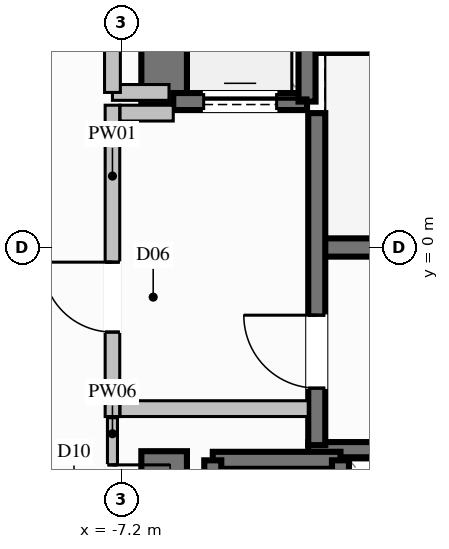
"""IFC4 building model, lengths in metres.
Left out: names, types, materials, properties, quantities, classifications, styles, units other than length and angle.
Written with IfcOpenShell. Run it as: python <this file> out.ifc"""

import sys

from ifc_helpers import new_model, si_unit, direction, frame, frame_2d, origin, place, context, subcontext, project, spatial, rectangle, extrude, element, fill, save


model = new_model("IFC4")
c1 = context("Model", 3, precision=1e-05, world=origin(), true_north=direction((0.0, 1.0)))
c2 = subcontext(c1, "Body", "Model", "MODEL_VIEW")
j1 = project(units=[si_unit("LENGTHUNIT", "METRE"), si_unit("PLANEANGLEUNIT", "RADIAN")], contexts=[c1])
p1 = place(None, origin())
s1 = spatial("IfcSite", under=j1, at=p1, CompositionType="ELEMENT")
p2 = place(p1, origin())
s2 = spatial("IfcBuilding", under=s1, at=p2, CompositionType="ELEMENT")
p3 = place(p2, frame((0.0, 0.0, 78.8)))
s3 = spatial("IfcBuildingStorey", under=s2, at=p3, CompositionType="ELEMENT", Elevation=78.8)
p4 = place(p3, frame((-3.99, 0.0, 0.0), z_axis=(0.0, 0.0, 1.0), x_axis=(1.0, 0.0, 0.0)))
e1 = element("IfcWall", 1, at=p4, inside=s3, PredefinedType="SHEAR", context=c2, shape_type="SweptSolid", body=[
    extrude(rectangle(XDim=7.98, YDim=0.3, at=frame_2d((3.99, 0.0))), origin(), (0.0, 0.0, 1.0), 3.6),
])
for number, where, z_axis, x_axis in (
    (2, (-4.13, -3.325, 0.0), (0.0, 0.0, 1.0), (1.0, 0.0, 0.0)),
    (3, (-4.13, 3.325, 0.0), (0.0, 0.0, 1.0), (1.0, 0.0, 0.0)),
):
    element("IfcWall", number, at=place(p3, frame(where, z_axis=z_axis, x_axis=x_axis)), inside=s3, PredefinedType="SOLIDWALL", context=c2, shape_type="SweptSolid", body=[
        extrude(rectangle(XDim=8.26, YDim=0.25, at=frame_2d((4.13, 0.0))), origin(), (0.0, 0.0, 1.0), 3.6),
    ])
p5 = place(p3, frame((-6.5, 2.35, 0.0), z_axis=(0.0, 0.0, 1.0), x_axis=(0.0, 1.0, 0.0)))
e4 = element("IfcWall", 4, at=p5, inside=s3, PredefinedType="SHEAR", context=c2, shape_type="SweptSolid", body=[
    extrude(rectangle(XDim=4.125, YDim=0.75, at=frame_2d((2.062, 0.0))), origin(), (0.0, 0.0, 1.0), 3.6),
])
p6 = place(p3, frame((-6.5, -6.475, 0.0), z_axis=(0.0, 0.0, 1.0), x_axis=(0.0, 1.0, 0.0)))
e5 = element("IfcWall", 5, at=p6, inside=s3, PredefinedType="SHEAR", context=c2, shape_type="SweptSolid", body=[
    extrude(rectangle(XDim=3.125, YDim=0.75, at=frame_2d((1.562, 0.0))), origin(), (0.0, 0.0, 1.0), 3.6),
])
p7 = place(p3, frame((-3.6, -3.5, 0.0), z_axis=(0.0, 0.0, 1.0), x_axis=(-1.0, 0.0, 0.0)))
e6 = element("IfcWall", 6, at=p7, inside=s3, PredefinedType="SOLIDWALL", context=c2, shape_type="SweptSolid", body=[
    extrude(rectangle(XDim=2.1, YDim=0.28, at=frame_2d((1.05, 0.0))), origin(), (0.0, 0.0, 1.0), 3.34),
])
for number, where, z_axis, x_axis in (
    (7, (-5.7, -3.5, 0.0), (0.0, 0.0, 1.0), (0.0, -1.0, 0.0)),
    (8, (-3.6, -6.0, 0.0), (0.0, 0.0, 1.0), (0.0, 1.0, 0.0)),
):
    element("IfcWall", number, at=place(p3, frame(where, z_axis=z_axis, x_axis=x_axis)), inside=s3, PredefinedType="SOLIDWALL", context=c2, shape_type="SweptSolid", body=[
        extrude(rectangle(XDim=2.5, YDim=0.28, at=frame_2d((1.25, 0.0))), origin(), (0.0, 0.0, 1.0), 3.34),
    ])
p8 = place(p3, frame((-6.35, 2.4, 0.0), z_axis=(0.0, 0.0, 1.0), x_axis=(1.0, 0.0, 0.0)))
e9 = element("IfcWall", 9, at=p8, inside=s3, PredefinedType="SOLIDWALL", context=c2, shape_type="SweptSolid", body=[
    extrude(rectangle(XDim=2.2, YDim=0.28, at=frame_2d((1.1, 0.0))), origin(), (0.0, 0.0, 1.0), 3.34),
])
p9 = place(p8, frame((0.5, 0.0, 0.0)))
e10 = element("IfcOpeningElement", 10, at=p9, cuts=e9, PredefinedType="OPENING", context=c2, shape_type="SweptSolid", body=[
    extrude(rectangle(XDim=1.2, YDim=2.2, at=frame_2d((0.6, 1.1))), frame((0.0, 0.15, 0.0), z_axis=(0.0, -1.0, 0.0), x_axis=(1.0, 0.0, 0.0)), (0.0, 0.0, 1.0), 0.3),
])
p10 = place(p3, frame((-4.15, 2.4, 0.0), z_axis=(0.0, 0.0, 1.0), x_axis=(0.0, 1.0, 0.0)))
e11 = element("IfcWall", 11, at=p10, inside=s3, PredefinedType="SOLIDWALL", context=c2, shape_type="SweptSolid", body=[
    extrude(rectangle(XDim=2.7, YDim=0.28, at=frame_2d((1.35, 0.0))), origin(), (0.0, 0.0, 1.0), 3.34),
])
p11 = place(p3, frame((-3.99, -3.25, 0.0), z_axis=(0.0, 0.0, 1.0), x_axis=(0.0, 1.0, 0.0)))
e12 = element("IfcWall", 12, at=p11, inside=s3, PredefinedType="SOLIDWALL", context=c2, shape_type="SweptSolid", body=[
    extrude(rectangle(XDim=5.46, YDim=0.28, at=frame_2d((2.73, 0.0))), origin(), (0.0, 0.0, 1.0), 3.34),
])
p12 = place(p11, frame((0.937, 0.0, 0.0)))
e13 = element("IfcOpeningElement", 13, at=p12, cuts=e12, PredefinedType="OPENING", context=c2, shape_type="SweptSolid", body=[
    extrude(rectangle(XDim=1.2, YDim=2.2, at=frame_2d((0.6, 1.1))), frame((0.0, 0.15, 0.0), z_axis=(0.0, -1.0, 0.0), x_axis=(1.0, 0.0, 0.0)), (0.0, 0.0, 1.0), 0.3),
])
p13 = place(p3, frame((-7.35, -2.78, 0.0), z_axis=(0.0, 0.0, 1.0), x_axis=(0.0, 1.0, 0.0)))
e14 = element("IfcWall", 14, at=p13, inside=s3, PredefinedType="PARTITIONING", context=c2, shape_type="SweptSolid", body=[
    extrude(rectangle(XDim=5.12, YDim=0.24, at=frame_2d((2.56, 0.0))), origin(), (0.0, 0.0, 1.0), 2.425),
])
p14 = place(p13, frame((1.389, 0.0, 0.0)))
e15 = element("IfcOpeningElement", 15, at=p14, cuts=e14, PredefinedType="OPENING", context=c2, shape_type="SweptSolid", body=[
    extrude(rectangle(XDim=1.15, YDim=2.2, at=frame_2d((0.575, 1.1))), frame((0.0, 0.13, 0.0), z_axis=(0.0, -1.0, 0.0), x_axis=(1.0, 0.0, 0.0)), (0.0, 0.0, 1.0), 0.26),
])
p15 = place(p3, frame((-7.225, -2.65, 0.0), z_axis=(0.0, 0.0, 1.0), x_axis=(1.0, 0.0, 0.0)))
e16 = element("IfcWall", 16, at=p15, inside=s3, PredefinedType="PARTITIONING", context=c2, shape_type="SweptSolid", body=[
    extrude(rectangle(XDim=3.095, YDim=0.26, at=frame_2d((1.548, 0.0))), origin(), (0.0, 0.0, 1.0), 3.34),
])
p16 = place(p3, frame((-7.225, 2.21, 0.0), z_axis=(0.0, 0.0, 1.0), x_axis=(1.0, 0.0, 0.0)))
e17 = element("IfcWall", 17, at=p16, inside=s3, PredefinedType="PARTITIONING", context=c2, shape_type="SweptSolid", body=[
    extrude(rectangle(XDim=0.875, YDim=0.26, at=frame_2d((0.438, 0.0))), origin(), (0.0, 0.0, 1.0), 3.34),
])
p17 = place(p3, frame((-7.35, 2.55, 0.0), z_axis=(0.0, 0.0, 1.0), x_axis=(1.0, 0.0, 0.0)))
e18 = element("IfcWall", 18, at=p17, inside=s3, PredefinedType="PARTITIONING", context=c2, shape_type="SweptSolid", body=[
    extrude(rectangle(XDim=0.93, YDim=0.26, at=frame_2d((0.465, 0.0))), origin(), (0.0, 0.0, 1.0), 3.34),
])
p18 = place(p3, frame((-7.35, 2.55, 0.0), z_axis=(0.0, 0.0, 1.0), x_axis=(0.0, 1.0, 0.0)))
e19 = element("IfcWall", 19, at=p18, inside=s3, PredefinedType="PARTITIONING", context=c2, shape_type="SweptSolid", body=[
    extrude(rectangle(XDim=2.4, YDim=0.26, at=frame_2d((1.2, 0.0))), origin(), (0.0, 0.0, 1.0), 2.425),
])
p19 = place(p18, frame((0.775, 0.0, 0.0)))
e20 = element("IfcOpeningElement", 20, at=p19, cuts=e19, PredefinedType="OPENING", context=c2, shape_type="SweptSolid", body=[
    extrude(rectangle(XDim=0.85, YDim=2.05, at=frame_2d((0.425, 1.025))), frame((0.0, 0.14, 0.0), z_axis=(0.0, -1.0, 0.0), x_axis=(1.0, 0.0, 0.0)), (0.0, 0.0, 1.0), 0.28),
])
p20 = place(p3, frame((-7.35, -2.8, 0.0), z_axis=(0.0, 0.0, 1.0), x_axis=(0.0, -1.0, 0.0)))
e21 = element("IfcWall", 21, at=p20, inside=s3, PredefinedType="PARTITIONING", context=c2, shape_type="SweptSolid", body=[
    extrude(rectangle(XDim=2.5, YDim=0.165, at=frame_2d((1.25, 0.0))), origin(), (0.0, 0.0, 1.0), 3.34),
])
p21 = place(p20, frame((0.775, 0.0, 0.0)))
e22 = element("IfcOpeningElement", 22, at=p21, cuts=e21, PredefinedType="OPENING", context=c2, shape_type="SweptSolid", body=[
    extrude(rectangle(XDim=0.95, YDim=2.1, at=frame_2d((0.475, 1.05))), frame((0.0, 0.093, 0.0), z_axis=(0.0, -1.0, 0.0), x_axis=(1.0, 0.0, 0.0)), (0.0, 0.0, 1.0), 0.185),
])
p22 = place(p9, origin())
e23 = element("IfcDoor", 23, at=p22, inside=s3, OperationType="SLIDING_TO_LEFT", PredefinedType="DOOR", context=c2, shape_type="SweptSolid", body=[
    extrude(rectangle(XDim=1.2, YDim=2.2, at=frame_2d((0.6, 1.1))), frame((0.0, 0.025, 0.0), z_axis=(0.0, -1.0, 0.0), x_axis=(1.0, 0.0, 0.0)), (0.0, 0.0, 1.0), 0.05),
])
fill(e10, e23)
p23 = place(p12, origin())
e24 = element("IfcDoor", 24, at=p23, inside=s3, OperationType="SINGLE_SWING_RIGHT", PredefinedType="DOOR", context=c2, shape_type="SweptSolid", body=[
    extrude(rectangle(XDim=1.2, YDim=2.2, at=frame_2d((0.6, 1.1))), frame((0.0, 0.025, 0.0), z_axis=(0.0, -1.0, 0.0), x_axis=(1.0, 0.0, 0.0)), (0.0, 0.0, 1.0), 0.05),
])
fill(e13, e24)
p24 = place(p14, origin())
e25 = element("IfcDoor", 25, at=p24, inside=s3, OperationType="SINGLE_SWING_RIGHT", PredefinedType="DOOR", context=c2, shape_type="SweptSolid", body=[
    extrude(rectangle(XDim=1.15, YDim=2.2, at=frame_2d((0.575, 1.1))), frame((0.0, 0.025, 0.0), z_axis=(0.0, -1.0, 0.0), x_axis=(1.0, 0.0, 0.0)), (0.0, 0.0, 1.0), 0.05),
])
fill(e15, e25)
p25 = place(p21, origin())
e26 = element("IfcDoor", 26, at=p25, inside=s3, OperationType="SINGLE_SWING_LEFT", PredefinedType="DOOR", context=c2, shape_type="SweptSolid", body=[
    extrude(rectangle(XDim=0.95, YDim=2.1, at=frame_2d((0.475, 1.05))), frame((0.0, 0.025, 0.0), z_axis=(0.0, -1.0, 0.0), x_axis=(1.0, 0.0, 0.0)), (0.0, 0.0, 1.0), 0.05),
])
fill(e22, e26)
save(model, sys.argv[1])
